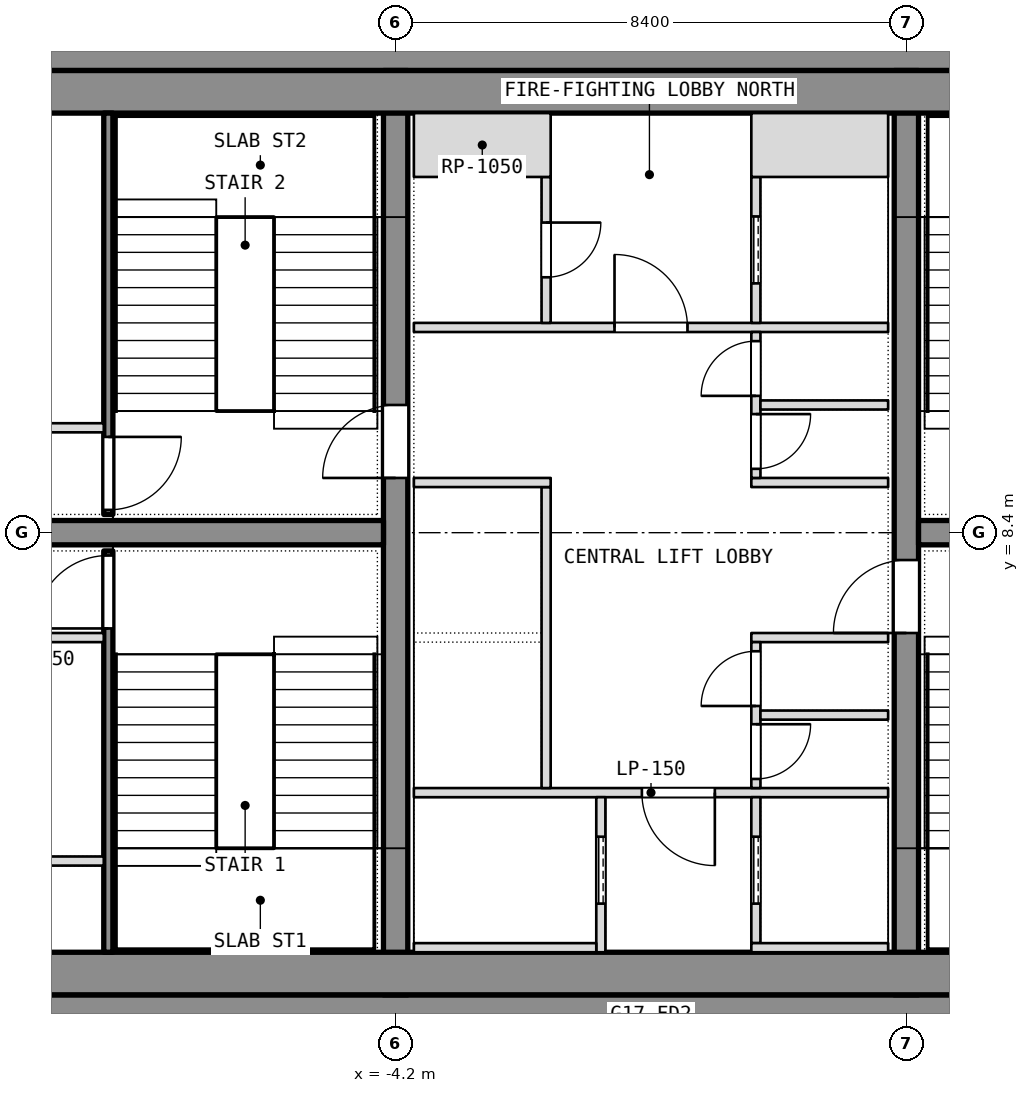
"""IFC4 building model, lengths in metres.
Left out: names, types, materials, properties, quantities, classifications, styles, units other than length and angle.
Written with IfcOpenShell. Run it as: python <this file> out.ifc"""

import sys

from ifc_helpers import new_model, si_unit, direction, frame, frame_2d, origin, place, context, subcontext, project, spatial, rectangle, extrude, element, fill, save


model = new_model("IFC4")
c1 = context("Model", 3, precision=1e-05, world=origin(), true_north=direction((0.0, 1.0)))
c2 = subcontext(c1, "Body", "Model", "MODEL_VIEW")
j1 = project(units=[si_unit("LENGTHUNIT", "METRE"), si_unit("PLANEANGLEUNIT", "RADIAN")], contexts=[c1])
p1 = place(None, origin())
s1 = spatial("IfcSite", under=j1, at=p1, CompositionType="ELEMENT")
p2 = place(p1, origin())
s2 = spatial("IfcBuilding", under=s1, at=p2, CompositionType="ELEMENT")
p3 = place(p2, frame((0.0, 0.0, 212.9)))
s3 = spatial("IfcBuildingStorey", under=s2, at=p3, CompositionType="ELEMENT", Elevation=212.9)
for number, where, z_axis, x_axis in (
    (1, (-11.1, 0.4, 0.0), (0.0, 0.0, 1.0), (1.0, 0.0, 0.0)),
    (2, (-11.1, 16.4, 0.0), (0.0, 0.0, 1.0), (1.0, 0.0, 0.0)),
):
    element("IfcWall", number, at=place(p3, frame(where, z_axis=z_axis, x_axis=x_axis)), inside=s3, PredefinedType="SHEAR", context=c2, shape_type="SweptSolid", body=[
        extrude(rectangle(XDim=22.2, YDim=0.8, at=frame_2d((11.1, 0.0))), origin(), (0.0, 0.0, 1.0), 3.6),
    ])
p4 = place(p3, frame((-4.2, 0.8, 0.0), z_axis=(0.0, 0.0, 1.0), x_axis=(0.0, 1.0, 0.0)))
e3 = element("IfcWall", 3, at=p4, inside=s3, PredefinedType="SHEAR", context=c2, shape_type="SweptSolid", body=[
    extrude(rectangle(XDim=15.2, YDim=0.4, at=frame_2d((7.6, 0.0))), origin(), (0.0, 0.0, 1.0), 3.6),
])
p5 = place(p4, frame((8.5, 0.0, 0.0)))
e4 = element("IfcOpeningElement", 4, at=p5, cuts=e3, PredefinedType="OPENING", context=c2, shape_type="SweptSolid", body=[
    extrude(rectangle(XDim=1.2, YDim=2.1, at=frame_2d((0.6, 1.05))), frame((0.0, 0.2, 0.0), z_axis=(0.0, -1.0, 0.0), x_axis=(1.0, 0.0, 0.0)), (0.0, 0.0, 1.0), 0.4),
])
p6 = place(p3, frame((4.2, 0.8, 0.0), z_axis=(0.0, 0.0, 1.0), x_axis=(0.0, 1.0, 0.0)))
e5 = element("IfcWall", 5, at=p6, inside=s3, PredefinedType="SHEAR", context=c2, shape_type="SweptSolid", body=[
    extrude(rectangle(XDim=15.2, YDim=0.4, at=frame_2d((7.6, 0.0))), origin(), (0.0, 0.0, 1.0), 3.6),
])
p7 = place(p6, frame((5.95, 0.0, 0.0)))
e6 = element("IfcOpeningElement", 6, at=p7, cuts=e5, PredefinedType="OPENING", context=c2, shape_type="SweptSolid", body=[
    extrude(rectangle(XDim=1.2, YDim=2.1, at=frame_2d((0.6, 1.05))), frame((0.0, 0.2, 0.0), z_axis=(0.0, -1.0, 0.0), x_axis=(1.0, 0.0, 0.0)), (0.0, 0.0, 1.0), 0.4),
])
for number, where, z_axis, x_axis in (
    (7, (-11.1, 8.4, 0.0), (0.0, 0.0, 1.0), (1.0, 0.0, 0.0)),
    (8, (4.4, 8.4, 0.0), (0.0, 0.0, 1.0), (1.0, 0.0, 0.0)),
):
    element("IfcWall", number, at=place(p3, frame(where, z_axis=z_axis, x_axis=x_axis)), inside=s3, PredefinedType="SHEAR", context=c2, shape_type="SweptSolid", body=[
        extrude(rectangle(XDim=6.7, YDim=0.4, at=frame_2d((3.35, 0.0))), origin(), (0.0, 0.0, 1.0), 3.6),
    ])
for number, where, z_axis, x_axis in (
    (9, (-11.1, 1.15, 0.0), (0.0, 0.0, 1.0), (1.0, 0.0, 0.0)),
    (10, (-11.1, 15.65, 0.0), (0.0, 0.0, 1.0), (1.0, 0.0, 0.0)),
):
    element("IfcWall", number, at=place(p3, frame(where, z_axis=z_axis, x_axis=x_axis)), inside=s3, PredefinedType="PARTITIONING", context=c2, shape_type="SweptSolid", body=[
        extrude(rectangle(XDim=22.2, YDim=0.7, at=frame_2d((11.1, 0.0))), origin(), (0.0, 0.0, 1.0), 3.34),
    ])
p8 = place(p3, frame((-8.925, 1.5, 0.0), z_axis=(0.0, 0.0, 1.0), x_axis=(0.0, 1.0, 0.0)))
e11 = element("IfcWall", 11, at=p8, inside=s3, PredefinedType="SHEAR", context=c2, shape_type="SweptSolid", body=[
    extrude(rectangle(XDim=6.6, YDim=0.15, at=frame_2d((3.3, 0.0))), origin(), (0.0, 0.0, 1.0), 3.34),
])
p9 = place(p8, frame((5.325, 0.0, 0.0)))
e12 = element("IfcOpeningElement", 12, at=p9, cuts=e11, PredefinedType="OPENING", context=c2, shape_type="SweptSolid", body=[
    extrude(rectangle(XDim=1.2, YDim=2.1, at=frame_2d((0.6, 1.05))), frame((0.0, 0.075, 0.0), z_axis=(0.0, -1.0, 0.0), x_axis=(1.0, 0.0, 0.0)), (0.0, 0.0, 1.0), 0.15),
])
for number, where, z_axis, x_axis in (
    (13, (-11.1, 6.675, 0.0), (0.0, 0.0, 1.0), (1.0, 0.0, 0.0)),
    (14, (-11.1, 3.0, 0.0), (0.0, 0.0, 1.0), (1.0, 0.0, 0.0)),
):
    element("IfcWall", number, at=place(p3, frame(where, z_axis=z_axis, x_axis=x_axis)), inside=s3, PredefinedType="PARTITIONING", context=c2, shape_type="SweptSolid", body=[
        extrude(rectangle(XDim=2.1, YDim=0.15, at=frame_2d((1.05, 0.0))), origin(), (0.0, 0.0, 1.0), 3.34),
    ])
p10 = place(p3, frame((-8.925, 8.7, 0.0), z_axis=(0.0, 0.0, 1.0), x_axis=(0.0, 1.0, 0.0)))
e15 = element("IfcWall", 15, at=p10, inside=s3, PredefinedType="SHEAR", context=c2, shape_type="SweptSolid", body=[
    extrude(rectangle(XDim=6.6, YDim=0.15, at=frame_2d((3.3, 0.0))), origin(), (0.0, 0.0, 1.0), 3.34),
])
p11 = place(p10, frame((0.075, 0.0, 0.0)))
e16 = element("IfcOpeningElement", 16, at=p11, cuts=e15, PredefinedType="OPENING", context=c2, shape_type="SweptSolid", body=[
    extrude(rectangle(XDim=1.2, YDim=2.1, at=frame_2d((0.6, 1.05))), frame((0.0, 0.075, 0.0), z_axis=(0.0, -1.0, 0.0), x_axis=(1.0, 0.0, 0.0)), (0.0, 0.0, 1.0), 0.15),
])
p12 = place(p3, frame((-11.1, 10.125, 0.0), z_axis=(0.0, 0.0, 1.0), x_axis=(1.0, 0.0, 0.0)))
e17 = element("IfcWall", 17, at=p12, inside=s3, PredefinedType="PARTITIONING", context=c2, shape_type="SweptSolid", body=[
    extrude(rectangle(XDim=2.1, YDim=0.15, at=frame_2d((1.05, 0.0))), origin(), (0.0, 0.0, 1.0), 3.34),
])
p13 = place(p3, frame((-3.9, 4.125, 0.0), z_axis=(0.0, 0.0, 1.0), x_axis=(1.0, 0.0, 0.0)))
e18 = element("IfcWall", 18, at=p13, inside=s3, PredefinedType="PARTITIONING", context=c2, shape_type="SweptSolid", body=[
    extrude(rectangle(XDim=7.8, YDim=0.15, at=frame_2d((3.9, 0.0))), origin(), (0.0, 0.0, 1.0), 3.34),
])
p14 = place(p13, frame((3.75, 0.0, 0.0)))
e19 = element("IfcOpeningElement", 19, at=p14, cuts=e18, PredefinedType="OPENING", context=c2, shape_type="SweptSolid", body=[
    extrude(rectangle(XDim=1.2, YDim=2.1, at=frame_2d((0.6, 1.05))), frame((0.0, 0.075, 0.0), z_axis=(0.0, -1.0, 0.0), x_axis=(1.0, 0.0, 0.0)), (0.0, 0.0, 1.0), 0.15),
])
p15 = place(p3, frame((-3.9, 11.775, 0.0), z_axis=(0.0, 0.0, 1.0), x_axis=(1.0, 0.0, 0.0)))
e20 = element("IfcWall", 20, at=p15, inside=s3, PredefinedType="PARTITIONING", context=c2, shape_type="SweptSolid", body=[
    extrude(rectangle(XDim=7.8, YDim=0.15, at=frame_2d((3.9, 0.0))), origin(), (0.0, 0.0, 1.0), 3.34),
])
p16 = place(p15, frame((3.3, 0.0, 0.0)))
e21 = element("IfcOpeningElement", 21, at=p16, cuts=e20, PredefinedType="OPENING", context=c2, shape_type="SweptSolid", body=[
    extrude(rectangle(XDim=1.2, YDim=2.1, at=frame_2d((0.6, 1.05))), frame((0.0, 0.075, 0.0), z_axis=(0.0, -1.0, 0.0), x_axis=(1.0, 0.0, 0.0)), (0.0, 0.0, 1.0), 0.15),
])
p17 = place(p3, frame((-0.825, 1.5, 0.0), z_axis=(0.0, 0.0, 1.0), x_axis=(0.0, 1.0, 0.0)))
e22 = element("IfcWall", 22, at=p17, inside=s3, PredefinedType="SHEAR", context=c2, shape_type="SweptSolid", body=[
    extrude(rectangle(XDim=2.55, YDim=0.15, at=frame_2d((1.275, 0.0))), origin(), (0.0, 0.0, 1.0), 3.6),
])
p18 = place(p17, frame((0.8, 0.0, 0.0)))
e23 = element("IfcOpeningElement", 23, at=p18, cuts=e22, PredefinedType="OPENING", context=c2, shape_type="SweptSolid", body=[
    extrude(rectangle(XDim=1.1, YDim=2.1, at=frame_2d((0.55, 1.05))), frame((0.0, 0.075, 0.0), z_axis=(0.0, -1.0, 0.0), x_axis=(1.0, 0.0, 0.0)), (0.0, 0.0, 1.0), 0.15),
])
p19 = place(p3, frame((-3.9, 1.575, 0.0), z_axis=(0.0, 0.0, 1.0), x_axis=(1.0, 0.0, 0.0)))
e24 = element("IfcWall", 24, at=p19, inside=s3, PredefinedType="SHEAR", context=c2, shape_type="SweptSolid", body=[
    extrude(rectangle(XDim=3.0, YDim=0.15, at=frame_2d((1.5, 0.0))), origin(), (0.0, 0.0, 1.0), 3.6),
])
p20 = place(p3, frame((-1.725, 4.2, 0.0), z_axis=(0.0, 0.0, 1.0), x_axis=(0.0, 1.0, 0.0)))
e25 = element("IfcWall", 25, at=p20, inside=s3, PredefinedType="SHEAR", context=c2, shape_type="SweptSolid", body=[
    extrude(rectangle(XDim=4.95, YDim=0.15, at=frame_2d((2.475, 0.0))), origin(), (0.0, 0.0, 1.0), 3.6),
])
p21 = place(p3, frame((-3.9, 9.225, 0.0), z_axis=(0.0, 0.0, 1.0), x_axis=(1.0, 0.0, 0.0)))
e26 = element("IfcWall", 26, at=p21, inside=s3, PredefinedType="SHEAR", context=c2, shape_type="SweptSolid", body=[
    extrude(rectangle(XDim=2.25, YDim=0.15, at=frame_2d((1.125, 0.0))), origin(), (0.0, 0.0, 1.0), 3.6),
])
p22 = place(p3, frame((-1.725, 11.85, 0.0), z_axis=(0.0, 0.0, 1.0), x_axis=(0.0, 1.0, 0.0)))
e27 = element("IfcWall", 27, at=p22, inside=s3, PredefinedType="PARTITIONING", context=c2, shape_type="SweptSolid", body=[
    extrude(rectangle(XDim=2.4, YDim=0.15, at=frame_2d((1.2, 0.0))), origin(), (0.0, 0.0, 1.0), 3.34),
])
p23 = place(p22, frame((0.75, 0.0, 0.0)))
e28 = element("IfcOpeningElement", 28, at=p23, cuts=e27, PredefinedType="OPENING", context=c2, shape_type="SweptSolid", body=[
    extrude(rectangle(XDim=0.9, YDim=2.1, at=frame_2d((0.45, 1.05))), frame((0.0, 0.075, 0.0), z_axis=(0.0, -1.0, 0.0), x_axis=(1.0, 0.0, 0.0)), (0.0, 0.0, 1.0), 0.15),
])
p24 = place(p3, frame((-3.9, 14.775, 0.0), z_axis=(0.0, 0.0, 1.0), x_axis=(1.0, 0.0, 0.0)))
e29 = element("IfcWall", 29, at=p24, inside=s3, PredefinedType="PARTITIONING", context=c2, shape_type="SweptSolid", body=[
    extrude(rectangle(XDim=2.25, YDim=1.05, at=frame_2d((1.125, 0.0))), origin(), (0.0, 0.0, 1.0), 3.34),
])
p25 = place(p3, frame((1.725, 1.65, 0.0), z_axis=(0.0, 0.0, 1.0), x_axis=(0.0, 1.0, 0.0)))
e30 = element("IfcWall", 30, at=p25, inside=s3, PredefinedType="SHEAR", context=c2, shape_type="SweptSolid", body=[
    extrude(rectangle(XDim=2.4, YDim=0.15, at=frame_2d((1.2, 0.0))), origin(), (0.0, 0.0, 1.0), 3.6),
])
p26 = place(p25, frame((0.65, 0.0, 0.0)))
e31 = element("IfcOpeningElement", 31, at=p26, cuts=e30, PredefinedType="OPENING", context=c2, shape_type="SweptSolid", body=[
    extrude(rectangle(XDim=1.1, YDim=2.1, at=frame_2d((0.55, 1.05))), frame((0.0, 0.075, 0.0), z_axis=(0.0, -1.0, 0.0), x_axis=(1.0, 0.0, 0.0)), (0.0, 0.0, 1.0), 0.15),
])
p27 = place(p3, frame((1.65, 1.575, 0.0), z_axis=(0.0, 0.0, 1.0), x_axis=(1.0, 0.0, 0.0)))
e32 = element("IfcWall", 32, at=p27, inside=s3, PredefinedType="SHEAR", context=c2, shape_type="SweptSolid", body=[
    extrude(rectangle(XDim=2.25, YDim=0.15, at=frame_2d((1.125, 0.0))), origin(), (0.0, 0.0, 1.0), 3.6),
])
p28 = place(p3, frame((1.725, 11.85, 0.0), z_axis=(0.0, 0.0, 1.0), x_axis=(0.0, 1.0, 0.0)))
e33 = element("IfcWall", 33, at=p28, inside=s3, PredefinedType="SHEAR", context=c2, shape_type="SweptSolid", body=[
    extrude(rectangle(XDim=2.4, YDim=0.15, at=frame_2d((1.2, 0.0))), origin(), (0.0, 0.0, 1.0), 3.6),
])
p29 = place(p28, frame((0.65, 0.0, 0.0)))
e34 = element("IfcOpeningElement", 34, at=p29, cuts=e33, PredefinedType="OPENING", context=c2, shape_type="SweptSolid", body=[
    extrude(rectangle(XDim=1.1, YDim=2.1, at=frame_2d((0.55, 1.05))), frame((0.0, 0.075, 0.0), z_axis=(0.0, -1.0, 0.0), x_axis=(1.0, 0.0, 0.0)), (0.0, 0.0, 1.0), 0.15),
])
p30 = place(p3, frame((1.65, 14.775, 0.0), z_axis=(0.0, 0.0, 1.0), x_axis=(1.0, 0.0, 0.0)))
e35 = element("IfcWall", 35, at=p30, inside=s3, PredefinedType="SHEAR", context=c2, shape_type="SweptSolid", body=[
    extrude(rectangle(XDim=2.25, YDim=1.05, at=frame_2d((1.125, 0.0))), origin(), (0.0, 0.0, 1.0), 3.6),
])
for number, where, z_axis, x_axis in (
    (36, (1.65, 6.675, 0.0), (0.0, 0.0, 1.0), (1.0, 0.0, 0.0)),
    (37, (1.65, 9.225, 0.0), (0.0, 0.0, 1.0), (1.0, 0.0, 0.0)),
):
    element("IfcWall", number, at=place(p3, frame(where, z_axis=z_axis, x_axis=x_axis)), inside=s3, PredefinedType="PARTITIONING", context=c2, shape_type="SweptSolid", body=[
        extrude(rectangle(XDim=2.25, YDim=0.15, at=frame_2d((1.125, 0.0))), origin(), (0.0, 0.0, 1.0), 3.34),
    ])
p31 = place(p3, frame((1.725, 4.2, 0.0), z_axis=(0.0, 0.0, 1.0), x_axis=(0.0, 1.0, 0.0)))
e38 = element("IfcWall", 38, at=p31, inside=s3, PredefinedType="PARTITIONING", context=c2, shape_type="SweptSolid", body=[
    extrude(rectangle(XDim=2.4, YDim=0.15, at=frame_2d((1.2, 0.0))), origin(), (0.0, 0.0, 1.0), 3.34),
])
p32 = place(p31, frame((0.15, 0.0, 0.0)))
e39 = element("IfcOpeningElement", 39, at=p32, cuts=e38, PredefinedType="OPENING", context=c2, shape_type="SweptSolid", body=[
    extrude(rectangle(XDim=0.9, YDim=2.1, at=frame_2d((0.45, 1.05))), frame((0.0, 0.075, 0.0), z_axis=(0.0, -1.0, 0.0), x_axis=(1.0, 0.0, 0.0)), (0.0, 0.0, 1.0), 0.15),
])
p33 = place(p31, frame((1.35, 0.0, 0.0)))
e40 = element("IfcOpeningElement", 40, at=p33, cuts=e38, PredefinedType="OPENING", context=c2, shape_type="SweptSolid", body=[
    extrude(rectangle(XDim=0.9, YDim=2.1, at=frame_2d((0.45, 1.05))), frame((0.0, 0.075, 0.0), z_axis=(0.0, -1.0, 0.0), x_axis=(1.0, 0.0, 0.0)), (0.0, 0.0, 1.0), 0.15),
])
p34 = place(p3, frame((1.725, 9.3, 0.0), z_axis=(0.0, 0.0, 1.0), x_axis=(0.0, 1.0, 0.0)))
e41 = element("IfcWall", 41, at=p34, inside=s3, PredefinedType="PARTITIONING", context=c2, shape_type="SweptSolid", body=[
    extrude(rectangle(XDim=2.4, YDim=0.15, at=frame_2d((1.2, 0.0))), origin(), (0.0, 0.0, 1.0), 3.34),
])
p35 = place(p34, frame((0.15, 0.0, 0.0)))
e42 = element("IfcOpeningElement", 42, at=p35, cuts=e41, PredefinedType="OPENING", context=c2, shape_type="SweptSolid", body=[
    extrude(rectangle(XDim=0.9, YDim=2.1, at=frame_2d((0.45, 1.05))), frame((0.0, 0.075, 0.0), z_axis=(0.0, -1.0, 0.0), x_axis=(1.0, 0.0, 0.0)), (0.0, 0.0, 1.0), 0.15),
])
p36 = place(p34, frame((1.35, 0.0, 0.0)))
e43 = element("IfcOpeningElement", 43, at=p36, cuts=e41, PredefinedType="OPENING", context=c2, shape_type="SweptSolid", body=[
    extrude(rectangle(XDim=0.9, YDim=2.1, at=frame_2d((0.45, 1.05))), frame((0.0, 0.075, 0.0), z_axis=(0.0, -1.0, 0.0), x_axis=(1.0, 0.0, 0.0)), (0.0, 0.0, 1.0), 0.15),
])
for number, where, z_axis, x_axis in (
    (44, (1.8, 5.4, 0.0), (0.0, 0.0, 1.0), (1.0, 0.0, 0.0)),
    (45, (1.8, 10.5, 0.0), (0.0, 0.0, 1.0), (1.0, 0.0, 0.0)),
):
    element("IfcWall", number, at=place(p3, frame(where, z_axis=z_axis, x_axis=x_axis)), inside=s3, PredefinedType="PARTITIONING", context=c2, shape_type="SweptSolid", body=[
        extrude(rectangle(XDim=2.1, YDim=0.15, at=frame_2d((1.05, 0.0))), origin(), (0.0, 0.0, 1.0), 3.34),
    ])
p37 = place(p9, origin())
e46 = element("IfcDoor", 46, at=p37, inside=s3, OperationType="SINGLE_SWING_LEFT", PredefinedType="DOOR", context=c2, shape_type="SweptSolid", body=[
    extrude(rectangle(XDim=1.2, YDim=2.1, at=frame_2d((0.6, 1.05))), frame((0.0, 0.025, 0.0), z_axis=(0.0, -1.0, 0.0), x_axis=(1.0, 0.0, 0.0)), (0.0, 0.0, 1.0), 0.05),
])
fill(e12, e46)
p38 = place(p11, origin())
e47 = element("IfcDoor", 47, at=p38, inside=s3, OperationType="SINGLE_SWING_LEFT", PredefinedType="DOOR", context=c2, shape_type="SweptSolid", body=[
    extrude(rectangle(XDim=1.2, YDim=2.1, at=frame_2d((0.6, 1.05))), frame((0.0, 0.025, 0.0), z_axis=(0.0, -1.0, 0.0), x_axis=(1.0, 0.0, 0.0)), (0.0, 0.0, 1.0), 0.05),
])
fill(e16, e47)
p39 = place(p32, origin())
e48 = element("IfcDoor", 48, at=p39, inside=s3, OperationType="SINGLE_SWING_LEFT", PredefinedType="DOOR", context=c2, shape_type="SweptSolid", body=[
    extrude(rectangle(XDim=0.9, YDim=2.1, at=frame_2d((0.45, 1.05))), frame((0.0, 0.025, 0.0), z_axis=(0.0, -1.0, 0.0), x_axis=(1.0, 0.0, 0.0)), (0.0, 0.0, 1.0), 0.05),
])
fill(e39, e48)
p40 = place(p33, origin())
e49 = element("IfcDoor", 49, at=p40, inside=s3, OperationType="SINGLE_SWING_LEFT", PredefinedType="DOOR", context=c2, shape_type="SweptSolid", body=[
    extrude(rectangle(XDim=0.9, YDim=2.1, at=frame_2d((0.45, 1.05))), frame((0.0, 0.025, 0.0), z_axis=(0.0, -1.0, 0.0), x_axis=(1.0, 0.0, 0.0)), (0.0, 0.0, 1.0), 0.05),
])
fill(e40, e49)
p41 = place(p35, origin())
e50 = element("IfcDoor", 50, at=p41, inside=s3, OperationType="SINGLE_SWING_LEFT", PredefinedType="DOOR", context=c2, shape_type="SweptSolid", body=[
    extrude(rectangle(XDim=0.9, YDim=2.1, at=frame_2d((0.45, 1.05))), frame((0.0, 0.025, 0.0), z_axis=(0.0, -1.0, 0.0), x_axis=(1.0, 0.0, 0.0)), (0.0, 0.0, 1.0), 0.05),
])
fill(e42, e50)
p42 = place(p36, origin())
e51 = element("IfcDoor", 51, at=p42, inside=s3, OperationType="SINGLE_SWING_LEFT", PredefinedType="DOOR", context=c2, shape_type="SweptSolid", body=[
    extrude(rectangle(XDim=0.9, YDim=2.1, at=frame_2d((0.45, 1.05))), frame((0.0, 0.025, 0.0), z_axis=(0.0, -1.0, 0.0), x_axis=(1.0, 0.0, 0.0)), (0.0, 0.0, 1.0), 0.05),
])
fill(e43, e51)
p43 = place(p18, origin())
e52 = element("IfcDoor", 52, at=p43, inside=s3, OperationType="SLIDING_TO_LEFT", PredefinedType="DOOR", context=c2, shape_type="SweptSolid", body=[
    extrude(rectangle(XDim=1.1, YDim=2.1, at=frame_2d((0.55, 1.05))), frame((0.0, 0.025, 0.0), z_axis=(0.0, -1.0, 0.0), x_axis=(1.0, 0.0, 0.0)), (0.0, 0.0, 1.0), 0.05),
])
fill(e23, e52)
p44 = place(p26, origin())
e53 = element("IfcDoor", 53, at=p44, inside=s3, OperationType="SLIDING_TO_LEFT", PredefinedType="DOOR", context=c2, shape_type="SweptSolid", body=[
    extrude(rectangle(XDim=1.1, YDim=2.1, at=frame_2d((0.55, 1.05))), frame((0.0, 0.025, 0.0), z_axis=(0.0, -1.0, 0.0), x_axis=(1.0, 0.0, 0.0)), (0.0, 0.0, 1.0), 0.05),
])
fill(e31, e53)
p45 = place(p29, origin())
e54 = element("IfcDoor", 54, at=p45, inside=s3, OperationType="SLIDING_TO_LEFT", PredefinedType="DOOR", context=c2, shape_type="SweptSolid", body=[
    extrude(rectangle(XDim=1.1, YDim=2.1, at=frame_2d((0.55, 1.05))), frame((0.0, 0.025, 0.0), z_axis=(0.0, -1.0, 0.0), x_axis=(1.0, 0.0, 0.0)), (0.0, 0.0, 1.0), 0.05),
])
fill(e34, e54)
p46 = place(p14, origin())
e55 = element("IfcDoor", 55, at=p46, inside=s3, OperationType="SINGLE_SWING_LEFT", PredefinedType="DOOR", context=c2, shape_type="SweptSolid", body=[
    extrude(rectangle(XDim=1.2, YDim=2.1, at=frame_2d((0.6, 1.05))), frame((0.0, 0.025, 0.0), z_axis=(0.0, -1.0, 0.0), x_axis=(1.0, 0.0, 0.0)), (0.0, 0.0, 1.0), 0.05),
])
fill(e19, e55)
p47 = place(p16, origin())
e56 = element("IfcDoor", 56, at=p47, inside=s3, OperationType="SINGLE_SWING_LEFT", PredefinedType="DOOR", context=c2, shape_type="SweptSolid", body=[
    extrude(rectangle(XDim=1.2, YDim=2.1, at=frame_2d((0.6, 1.05))), frame((0.0, 0.025, 0.0), z_axis=(0.0, -1.0, 0.0), x_axis=(1.0, 0.0, 0.0)), (0.0, 0.0, 1.0), 0.05),
])
fill(e21, e56)
p48 = place(p23, origin())
e57 = element("IfcDoor", 57, at=p48, inside=s3, OperationType="SINGLE_SWING_LEFT", PredefinedType="DOOR", context=c2, shape_type="SweptSolid", body=[
    extrude(rectangle(XDim=0.9, YDim=2.1, at=frame_2d((0.45, 1.05))), frame((0.0, 0.025, 0.0), z_axis=(0.0, -1.0, 0.0), x_axis=(1.0, 0.0, 0.0)), (0.0, 0.0, 1.0), 0.05),
])
fill(e28, e57)
p49 = place(p5, origin())
e58 = element("IfcDoor", 58, at=p49, inside=s3, OperationType="SINGLE_SWING_LEFT", PredefinedType="DOOR", context=c2, shape_type="SweptSolid", body=[
    extrude(rectangle(XDim=1.2, YDim=2.1, at=frame_2d((0.6, 1.05))), frame((0.0, 0.025, 0.0), z_axis=(0.0, -1.0, 0.0), x_axis=(1.0, 0.0, 0.0)), (0.0, 0.0, 1.0), 0.05),
])
fill(e4, e58)
p50 = place(p7, origin())
e59 = element("IfcDoor", 59, at=p50, inside=s3, OperationType="SINGLE_SWING_LEFT", PredefinedType="DOOR", context=c2, shape_type="SweptSolid", body=[
    extrude(rectangle(XDim=1.2, YDim=2.1, at=frame_2d((0.6, 1.05))), frame((0.0, 0.025, 0.0), z_axis=(0.0, -1.0, 0.0), x_axis=(1.0, 0.0, 0.0)), (0.0, 0.0, 1.0), 0.05),
])
fill(e6, e59)
save(model, sys.argv[1])
